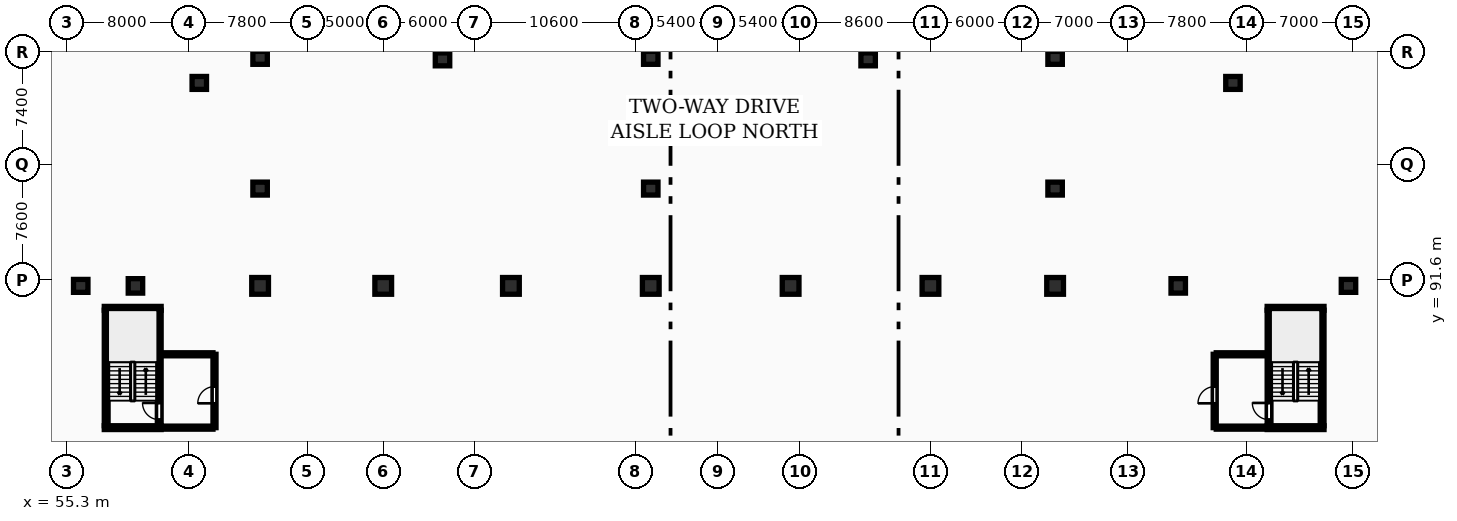
"""IFC4 building model, lengths in metres.
Left out: names, types, materials, properties, quantities, classifications, styles, units other than length and angle.
Written with IfcOpenShell. Run it as: python <this file> out.ifc"""

import sys

from ifc_helpers import new_model, si_unit, direction, frame, frame_2d, origin, origin_2d, place, context, subcontext, project, spatial, rectangle, circle, extrude, element, fill, save


model = new_model("IFC4")
c1 = context("Model", 3, precision=1e-05, world=origin(), true_north=direction((0.0, 1.0)))
c2 = subcontext(c1, "Body", "Model", "MODEL_VIEW")
j1 = project(units=[si_unit("LENGTHUNIT", "METRE"), si_unit("PLANEANGLEUNIT", "RADIAN")], contexts=[c1])
p1 = place(None, origin())
s1 = spatial("IfcSite", under=j1, at=p1, CompositionType="ELEMENT")
p2 = place(p1, origin())
s2 = spatial("IfcBuilding", under=s1, at=p2, CompositionType="ELEMENT")
p3 = place(p2, frame((0.0, 0.0, -3.6)))
s3 = spatial("IfcBuildingStorey", under=s2, at=p3, CompositionType="ELEMENT", Elevation=-3.6)
p4 = place(p3, frame((59.8, 91.2, 0.0), z_axis=(0.0, 0.0, 1.0), x_axis=(1.0, 0.0, 0.0)))
e1 = element("IfcColumn", 1, at=p4, inside=s3, PredefinedType="COLUMN", context=c2, shape_type="SweptSolid", body=[
    extrude(circle(Radius=0.475, at=origin_2d()), origin(), (0.0, 0.0, 1.0), 3.6),
])
for number, where, z_axis, x_axis in (
    (2, (68.0, 91.2, 0.0), (0.0, 0.0, 1.0), (1.0, 0.0, 0.0)),
    (3, (76.1, 91.2, 0.0), (0.0, 0.0, 1.0), (1.0, 0.0, 0.0)),
    (4, (84.5, 91.2, 0.0), (0.0, 0.0, 1.0), (1.0, 0.0, 0.0)),
    (5, (93.7, 91.2, 0.0), (0.0, 0.0, 1.0), (1.0, 0.0, 0.0)),
    (6, (102.9, 91.2, 0.0), (0.0, 0.0, 1.0), (1.0, 0.0, 0.0)),
    (7, (112.1, 91.2, 0.0), (0.0, 0.0, 1.0), (1.0, 0.0, 0.0)),
    (8, (120.3, 91.2, 0.0), (0.0, 0.0, 1.0), (1.0, 0.0, 0.0)),
):
    element("IfcColumn", number, at=place(p3, frame(where, z_axis=z_axis, x_axis=x_axis)), inside=s3, PredefinedType="COLUMN", context=c2, shape_type="SweptSolid", body=[
        extrude(rectangle(XDim=1.1, YDim=1.1, at=origin_2d()), origin(), (0.0, 0.0, 1.0), 3.6),
    ])
p5 = place(p3, frame((128.4, 91.2, 0.0), z_axis=(0.0, 0.0, 1.0), x_axis=(1.0, 0.0, 0.0)))
e9 = element("IfcColumn", 9, at=p5, inside=s3, PredefinedType="COLUMN", context=c2, shape_type="SweptSolid", body=[
    extrude(circle(Radius=0.475, at=origin_2d()), origin(), (0.0, 0.0, 1.0), 3.6),
])
for number, where, z_axis, x_axis in (
    (10, (56.2, 91.2, 0.0), (0.0, 0.0, 1.0), (1.0, 0.0, 0.0)),
    (11, (139.6, 91.2, 0.0), (0.0, 0.0, 1.0), (1.0, 0.0, 0.0)),
    (12, (68.0, 97.6, 0.0), (0.0, 0.0, 1.0), (1.0, 0.0, 0.0)),
    (13, (93.7, 97.6, 0.0), (0.0, 0.0, 1.0), (1.0, 0.0, 0.0)),
    (14, (120.3, 97.6, 0.0), (0.0, 0.0, 1.0), (1.0, 0.0, 0.0)),
    (15, (80.0, 106.1, 0.0), (0.0, 0.0, 1.0), (1.0, 0.0, 0.0)),
    (16, (108.0, 106.1, 0.0), (0.0, 0.0, 1.0), (1.0, 0.0, 0.0)),
    (17, (64.0, 104.55, 0.0), (0.0, 0.0, 1.0), (1.0, 0.0, 0.0)),
    (18, (132.0, 104.55, 0.0), (0.0, 0.0, 1.0), (1.0, 0.0, 0.0)),
    (19, (68.0, 106.2, 0.0), (0.0, 0.0, 1.0), (1.0, 0.0, 0.0)),
    (20, (93.7, 106.2, 0.0), (0.0, 0.0, 1.0), (1.0, 0.0, 0.0)),
    (21, (120.3, 106.2, 0.0), (0.0, 0.0, 1.0), (1.0, 0.0, 0.0)),
):
    element("IfcColumn", number, at=place(p3, frame(where, z_axis=z_axis, x_axis=x_axis)), inside=s3, PredefinedType="COLUMN", context=c2, shape_type="SweptSolid", body=[
        extrude(rectangle(XDim=0.95, YDim=0.85, at=origin_2d()), origin(), (0.0, 0.0, 1.0), 3.6),
    ])
p6 = place(p3, frame((134.375, 82.0, 0.0), z_axis=(0.0, 0.0, 1.0), x_axis=(0.0, 1.0, 0.0)))
e22 = element("IfcWall", 22, at=p6, inside=s3, PredefinedType="SHEAR", context=c2, shape_type="SweptSolid", body=[
    extrude(rectangle(XDim=7.6, YDim=0.25, at=frame_2d((3.8, 0.0))), origin(), (0.0, 0.0, 1.0), 3.6),
])
p7 = place(p6, frame((0.4, 0.0, 0.0)))
e23 = element("IfcOpeningElement", 23, at=p7, cuts=e22, PredefinedType="OPENING", context=c2, shape_type="SweptSolid", body=[
    extrude(rectangle(XDim=1.1, YDim=2.1, at=frame_2d((0.55, 1.05))), frame((0.0, 0.135, 0.0), z_axis=(0.0, -1.0, 0.0), x_axis=(1.0, 0.0, 0.0)), (0.0, 0.0, 1.0), 0.27),
])
p8 = place(p3, frame((137.865, 82.0, 0.0), z_axis=(0.0, 0.0, 1.0), x_axis=(0.0, 1.0, 0.0)))
e24 = element("IfcWall", 24, at=p8, inside=s3, PredefinedType="SHEAR", context=c2, shape_type="SweptSolid", body=[
    extrude(rectangle(XDim=7.6, YDim=0.25, at=frame_2d((3.8, 0.0))), origin(), (0.0, 0.0, 1.0), 3.6),
])
for number, where, z_axis, x_axis in (
    (25, (134.25, 81.875, 0.0), (0.0, 0.0, 1.0), (1.0, 0.0, 0.0)),
    (26, (134.25, 89.725, 0.0), (0.0, 0.0, 1.0), (1.0, 0.0, 0.0)),
):
    element("IfcWall", number, at=place(p3, frame(where, z_axis=z_axis, x_axis=x_axis)), inside=s3, PredefinedType="SHEAR", context=c2, shape_type="SweptSolid", body=[
        extrude(rectangle(XDim=3.74, YDim=0.25, at=frame_2d((1.87, 0.0))), origin(), (0.0, 0.0, 1.0), 3.6),
    ])
p9 = place(p3, frame((130.8, 81.875, 0.0), z_axis=(0.0, 0.0, 1.0), x_axis=(0.0, 1.0, 0.0)))
e27 = element("IfcWall", 27, at=p9, inside=s3, PredefinedType="PARTITIONING", context=c2, shape_type="SweptSolid", body=[
    extrude(rectangle(XDim=4.825, YDim=0.2, at=frame_2d((2.413, 0.0))), origin(), (0.0, 0.0, 1.0), 3.3),
])
p10 = place(p9, frame((1.6, 0.0, 0.0)))
e28 = element("IfcOpeningElement", 28, at=p10, cuts=e27, PredefinedType="OPENING", context=c2, shape_type="SweptSolid", body=[
    extrude(rectangle(XDim=1.1, YDim=2.15, at=frame_2d((0.55, 1.075))), frame((0.0, 0.11, 0.0), z_axis=(0.0, -1.0, 0.0), x_axis=(1.0, 0.0, 0.0)), (0.0, 0.0, 1.0), 0.22),
])
for number, where, z_axis, x_axis in (
    (29, (130.9, 81.875, 0.0), (0.0, 0.0, 1.0), (1.0, 0.0, 0.0)),
    (30, (130.9, 86.7, 0.0), (0.0, 0.0, 1.0), (1.0, 0.0, 0.0)),
):
    element("IfcWall", number, at=place(p3, frame(where, z_axis=z_axis, x_axis=x_axis)), inside=s3, PredefinedType="PARTITIONING", context=c2, shape_type="SweptSolid", body=[
        extrude(rectangle(XDim=3.35, YDim=0.2, at=frame_2d((1.675, 0.0))), origin(), (0.0, 0.0, 1.0), 3.3),
    ])
p11 = place(p3, frame((57.875, 82.0, 0.0), z_axis=(0.0, 0.0, 1.0), x_axis=(0.0, 1.0, 0.0)))
e31 = element("IfcWall", 31, at=p11, inside=s3, PredefinedType="SHEAR", context=c2, shape_type="SweptSolid", body=[
    extrude(rectangle(XDim=7.6, YDim=0.25, at=frame_2d((3.8, 0.0))), origin(), (0.0, 0.0, 1.0), 3.6),
])
for number, where, z_axis, x_axis in (
    (32, (57.75, 81.875, 0.0), (0.0, 0.0, 1.0), (1.0, 0.0, 0.0)),
    (33, (57.75, 89.725, 0.0), (0.0, 0.0, 1.0), (1.0, 0.0, 0.0)),
):
    element("IfcWall", number, at=place(p3, frame(where, z_axis=z_axis, x_axis=x_axis)), inside=s3, PredefinedType="SHEAR", context=c2, shape_type="SweptSolid", body=[
        extrude(rectangle(XDim=3.74, YDim=0.25, at=frame_2d((1.87, 0.0))), origin(), (0.0, 0.0, 1.0), 3.6),
    ])
p12 = place(p3, frame((61.365, 82.0, 0.0), z_axis=(0.0, 0.0, 1.0), x_axis=(0.0, 1.0, 0.0)))
e34 = element("IfcWall", 34, at=p12, inside=s3, PredefinedType="SHEAR", context=c2, shape_type="SweptSolid", body=[
    extrude(rectangle(XDim=7.6, YDim=0.25, at=frame_2d((3.8, 0.0))), origin(), (0.0, 0.0, 1.0), 3.6),
])
p13 = place(p12, frame((0.4, 0.0, 0.0)))
e35 = element("IfcOpeningElement", 35, at=p13, cuts=e34, PredefinedType="OPENING", context=c2, shape_type="SweptSolid", body=[
    extrude(rectangle(XDim=1.1, YDim=2.1, at=frame_2d((0.55, 1.05))), frame((0.0, 0.135, 0.0), z_axis=(0.0, -1.0, 0.0), x_axis=(1.0, 0.0, 0.0)), (0.0, 0.0, 1.0), 0.27),
])
p14 = place(p3, frame((65.0, 81.875, 0.0), z_axis=(0.0, 0.0, 1.0), x_axis=(0.0, 1.0, 0.0)))
e36 = element("IfcWall", 36, at=p14, inside=s3, PredefinedType="PARTITIONING", context=c2, shape_type="SweptSolid", body=[
    extrude(rectangle(XDim=4.825, YDim=0.2, at=frame_2d((2.413, 0.0))), origin(), (0.0, 0.0, 1.0), 3.3),
])
p15 = place(p14, frame((1.6, 0.0, 0.0)))
e37 = element("IfcOpeningElement", 37, at=p15, cuts=e36, PredefinedType="OPENING", context=c2, shape_type="SweptSolid", body=[
    extrude(rectangle(XDim=1.1, YDim=2.15, at=frame_2d((0.55, 1.075))), frame((0.0, 0.11, 0.0), z_axis=(0.0, -1.0, 0.0), x_axis=(1.0, 0.0, 0.0)), (0.0, 0.0, 1.0), 0.22),
])
for number, where, z_axis, x_axis in (
    (38, (61.5, 81.875, 0.0), (0.0, 0.0, 1.0), (1.0, 0.0, 0.0)),
    (39, (61.5, 86.7, 0.0), (0.0, 0.0, 1.0), (1.0, 0.0, 0.0)),
):
    element("IfcWall", number, at=place(p3, frame(where, z_axis=z_axis, x_axis=x_axis)), inside=s3, PredefinedType="PARTITIONING", context=c2, shape_type="SweptSolid", body=[
        extrude(rectangle(XDim=3.4, YDim=0.2, at=frame_2d((1.7, 0.0))), origin(), (0.0, 0.0, 1.0), 3.3),
    ])
p16 = place(p7, origin())
e40 = element("IfcDoor", 40, at=p16, inside=s3, OperationType="SINGLE_SWING_RIGHT", PredefinedType="DOOR", context=c2, shape_type="SweptSolid", body=[
    extrude(rectangle(XDim=1.1, YDim=2.1, at=frame_2d((0.55, 1.05))), frame((0.0, 0.025, 0.0), z_axis=(0.0, -1.0, 0.0), x_axis=(1.0, 0.0, 0.0)), (0.0, 0.0, 1.0), 0.05),
])
fill(e23, e40)
p17 = place(p10, origin())
e41 = element("IfcDoor", 41, at=p17, inside=s3, OperationType="SINGLE_SWING_LEFT", PredefinedType="DOOR", context=c2, shape_type="SweptSolid", body=[
    extrude(rectangle(XDim=1.1, YDim=2.15, at=frame_2d((0.55, 1.075))), frame((0.0, 0.025, 0.0), z_axis=(0.0, -1.0, 0.0), x_axis=(1.0, 0.0, 0.0)), (0.0, 0.0, 1.0), 0.05),
])
fill(e28, e41)
p18 = place(p13, origin())
e42 = element("IfcDoor", 42, at=p18, inside=s3, OperationType="SINGLE_SWING_RIGHT", PredefinedType="DOOR", context=c2, shape_type="SweptSolid", body=[
    extrude(rectangle(XDim=1.1, YDim=2.1, at=frame_2d((0.55, 1.05))), frame((0.0, 0.025, 0.0), z_axis=(0.0, -1.0, 0.0), x_axis=(1.0, 0.0, 0.0)), (0.0, 0.0, 1.0), 0.05),
])
fill(e35, e42)
p19 = place(p15, origin())
e43 = element("IfcDoor", 43, at=p19, inside=s3, OperationType="SINGLE_SWING_LEFT", PredefinedType="DOOR", context=c2, shape_type="SweptSolid", body=[
    extrude(rectangle(XDim=1.1, YDim=2.15, at=frame_2d((0.55, 1.075))), frame((0.0, 0.025, 0.0), z_axis=(0.0, -1.0, 0.0), x_axis=(1.0, 0.0, 0.0)), (0.0, 0.0, 1.0), 0.05),
])
fill(e37, e43)
save(model, sys.argv[1])
